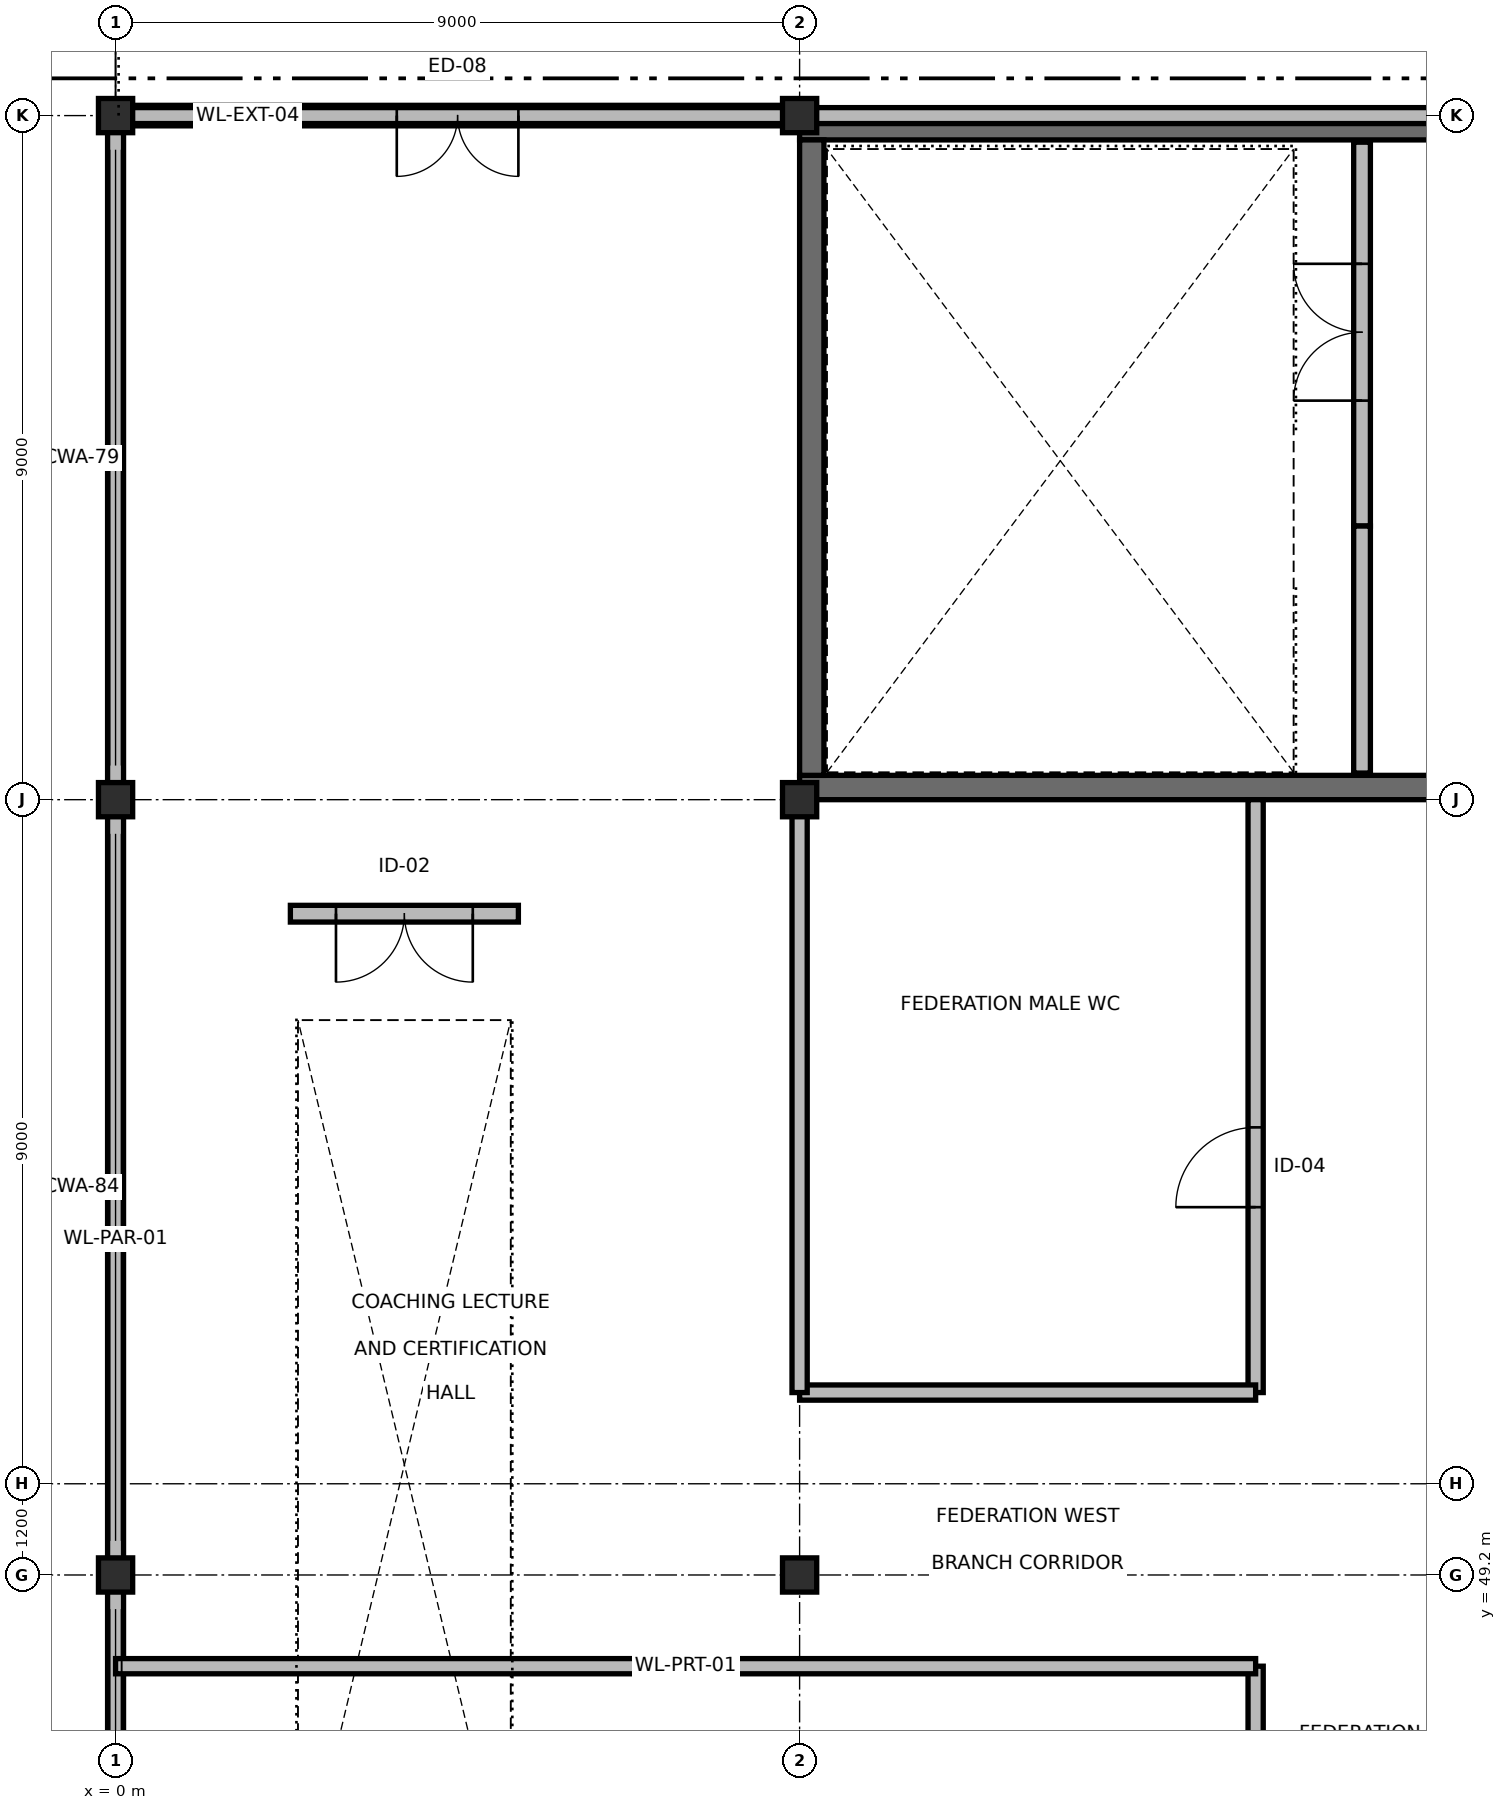
"""IFC4 building model, lengths in metres.
Left out: names, types, materials, properties, quantities, classifications, styles, units other than length and angle.
Written with IfcOpenShell. Run it as: python <this file> out.ifc"""

import sys

from ifc_helpers import new_model, si_unit, direction, frame, frame_2d, origin, origin_2d, place, context, subcontext, project, spatial, rectangle, extrude, element, fill, save


model = new_model("IFC4")
c1 = context("Model", 3, precision=1e-05, world=origin(), true_north=direction((0.0, 1.0)))
c2 = subcontext(c1, "Body", "Model", "MODEL_VIEW")
j1 = project(units=[si_unit("LENGTHUNIT", "METRE"), si_unit("PLANEANGLEUNIT", "RADIAN")], contexts=[c1])
p1 = place(None, origin())
s1 = spatial("IfcSite", under=j1, at=p1, CompositionType="ELEMENT")
p2 = place(p1, origin())
s2 = spatial("IfcBuilding", under=s1, at=p2, CompositionType="ELEMENT")
p3 = place(p2, frame((0.0, 0.0, 18.6)))
s3 = spatial("IfcBuildingStorey", under=s2, at=p3, CompositionType="ELEMENT", Elevation=18.6)
for number, where, z_axis, x_axis in (
    (1, (0.0, 49.2, 0.0), (0.0, 0.0, 1.0), (1.0, 0.0, 0.0)),
    (2, (0.0, 59.4, 0.0), (0.0, 0.0, 1.0), (1.0, 0.0, 0.0)),
    (3, (0.0, 68.4, 0.0), (0.0, 0.0, 1.0), (1.0, 0.0, 0.0)),
    (4, (9.0, 49.2, 0.0), (0.0, 0.0, 1.0), (1.0, 0.0, 0.0)),
    (5, (9.0, 59.4, 0.0), (0.0, 0.0, 1.0), (1.0, 0.0, 0.0)),
    (6, (9.0, 68.4, 0.0), (0.0, 0.0, 1.0), (1.0, 0.0, 0.0)),
):
    element("IfcColumn", number, at=place(p3, frame(where, z_axis=z_axis, x_axis=x_axis)), inside=s3, PredefinedType="COLUMN", context=c2, shape_type="SweptSolid", body=[
        extrude(rectangle(XDim=0.45, YDim=0.45, at=origin_2d()), origin(), (0.0, 0.0, 1.0), 4.2),
    ])
for number, where, z_axis, x_axis in (
    (7, (9.0, 59.56, 0.0), (0.0, 0.0, 1.0), (1.0, 0.0, 0.0)),
    (8, (9.0, 68.24, 0.0), (0.0, 0.0, 1.0), (1.0, 0.0, 0.0)),
):
    element("IfcWall", number, at=place(p3, frame(where, z_axis=z_axis, x_axis=x_axis)), inside=s3, PredefinedType="SHEAR", context=c2, shape_type="SweptSolid", body=[
        extrude(rectangle(XDim=9.2, YDim=0.32, at=frame_2d((4.6, 0.0))), origin(), (0.0, 0.0, 1.0), 4.2),
    ])
p4 = place(p3, frame((9.16, 59.72, 0.0), z_axis=(0.0, 0.0, 1.0), x_axis=(0.0, 1.0, 0.0)))
e9 = element("IfcWall", 9, at=p4, inside=s3, PredefinedType="SHEAR", context=c2, shape_type="SweptSolid", body=[
    extrude(rectangle(XDim=8.36, YDim=0.32, at=frame_2d((4.18, 0.0))), origin(), (0.0, 0.0, 1.0), 4.2),
])
p5 = place(p3, frame((0.23, 68.4, 0.0), z_axis=(0.0, 0.0, 1.0), x_axis=(1.0, 0.0, 0.0)))
e10 = element("IfcWall", 10, at=p5, inside=s3, PredefinedType="SOLIDWALL", context=c2, shape_type="SweptSolid", body=[
    extrude(rectangle(XDim=8.54, YDim=0.27, at=frame_2d((4.27, 0.0))), origin(), (0.0, 0.0, 1.0), 3.25),
])
p6 = place(p5, frame((3.47, 0.0, 0.0)))
e11 = element("IfcOpeningElement", 11, at=p6, cuts=e10, PredefinedType="OPENING", context=c2, shape_type="SweptSolid", body=[
    extrude(rectangle(XDim=1.6, YDim=2.2, at=frame_2d((0.8, 1.1))), frame((0.0, 0.145, 0.0), z_axis=(0.0, -1.0, 0.0), x_axis=(1.0, 0.0, 0.0)), (0.0, 0.0, 1.0), 0.29),
])
p7 = place(p3, frame((27.0, 68.4, 4.2), z_axis=(0.0, 0.0, 1.0), x_axis=(-1.0, 0.0, 0.0)))
e12 = element("IfcWall", 12, at=p7, inside=s3, PredefinedType="PARAPET", context=c2, shape_type="SweptSolid", body=[
    extrude(rectangle(XDim=27.0, YDim=0.21, at=frame_2d((13.5, 0.0))), origin(), (0.0, 0.0, 1.0), 1.15),
])
p8 = place(p3, frame((0.0, 68.29, 4.2), z_axis=(0.0, 0.0, 1.0), x_axis=(0.0, -1.0, 0.0)))
e13 = element("IfcWall", 13, at=p8, inside=s3, PredefinedType="PARAPET", context=c2, shape_type="SweptSolid", body=[
    extrude(rectangle(XDim=63.98, YDim=0.21, at=frame_2d((31.99, 0.0))), origin(), (0.0, 0.0, 1.0), 1.15),
])
p9 = place(p3, frame((16.4, 68.05, 0.0), z_axis=(0.0, 0.0, 1.0), x_axis=(0.0, -1.0, 0.0)))
e14 = element("IfcWall", 14, at=p9, inside=s3, PredefinedType="PARTITIONING", context=c2, shape_type="SweptSolid", body=[
    extrude(rectangle(XDim=5.05, YDim=0.22, at=frame_2d((2.525, 0.0))), origin(), (0.0, 0.0, 1.0), 3.255),
])
p10 = place(p9, frame((1.6, 0.0, 0.0)))
e15 = element("IfcOpeningElement", 15, at=p10, cuts=e14, PredefinedType="OPENING", context=c2, shape_type="SweptSolid", body=[
    extrude(rectangle(XDim=1.8, YDim=2.2, at=frame_2d((0.9, 1.1))), frame((0.0, 0.12, 0.0), z_axis=(0.0, -1.0, 0.0), x_axis=(1.0, 0.0, 0.0)), (0.0, 0.0, 1.0), 0.24),
])
p11 = place(p3, frame((16.4, 59.75, 0.0), z_axis=(0.0, 0.0, 1.0), x_axis=(0.0, 1.0, 0.0)))
e16 = element("IfcWall", 16, at=p11, inside=s3, PredefinedType="PARTITIONING", context=c2, shape_type="SweptSolid", body=[
    extrude(rectangle(XDim=3.25, YDim=0.22, at=frame_2d((1.625, 0.0))), origin(), (0.0, 0.0, 1.0), 3.305),
])
p12 = place(p3, frame((15.0, 36.6, 0.0), z_axis=(0.0, 0.0, 1.0), x_axis=(0.0, 1.0, 0.0)))
e17 = element("IfcWall", 17, at=p12, inside=s3, PredefinedType="PARTITIONING", context=c2, shape_type="SweptSolid", body=[
    extrude(rectangle(XDim=11.4, YDim=0.2, at=frame_2d((5.7, 0.0))), origin(), (0.0, 0.0, 1.0), 3.305),
])
p13 = place(p12, frame((7.683, 0.0, 0.0)))
e18 = element("IfcOpeningElement", 18, at=p13, cuts=e17, PredefinedType="OPENING", context=c2, shape_type="SweptSolid", body=[
    extrude(rectangle(XDim=1.05, YDim=2.15, at=frame_2d((0.525, 1.075))), frame((0.0, 0.11, 0.0), z_axis=(0.0, -1.0, 0.0), x_axis=(1.0, 0.0, 0.0)), (0.0, 0.0, 1.0), 0.22),
])
p14 = place(p3, frame((0.0, 48.0, 0.0), z_axis=(0.0, 0.0, 1.0), x_axis=(1.0, 0.0, 0.0)))
e19 = element("IfcWall", 19, at=p14, inside=s3, PredefinedType="PARTITIONING", context=c2, shape_type="SweptSolid", body=[
    extrude(rectangle(XDim=15.0, YDim=0.2, at=frame_2d((7.5, 0.0))), origin(), (0.0, 0.0, 1.0), 3.255),
])
p15 = place(p3, frame((15.0, 51.6, 0.0), z_axis=(0.0, 0.0, 1.0), x_axis=(0.0, 1.0, 0.0)))
e20 = element("IfcWall", 20, at=p15, inside=s3, PredefinedType="PARTITIONING", context=c2, shape_type="SweptSolid", body=[
    extrude(rectangle(XDim=7.8, YDim=0.2, at=frame_2d((3.9, 0.0))), origin(), (0.0, 0.0, 1.0), 3.305),
])
p16 = place(p15, frame((2.439, 0.0, 0.0)))
e21 = element("IfcOpeningElement", 21, at=p16, cuts=e20, PredefinedType="OPENING", context=c2, shape_type="SweptSolid", body=[
    extrude(rectangle(XDim=1.05, YDim=2.15, at=frame_2d((0.525, 1.075))), frame((0.0, 0.11, 0.0), z_axis=(0.0, -1.0, 0.0), x_axis=(1.0, 0.0, 0.0)), (0.0, 0.0, 1.0), 0.22),
])
p17 = place(p3, frame((9.0, 51.6, 0.0), z_axis=(0.0, 0.0, 1.0), x_axis=(1.0, 0.0, 0.0)))
e22 = element("IfcWall", 22, at=p17, inside=s3, PredefinedType="PARTITIONING", context=c2, shape_type="SweptSolid", body=[
    extrude(rectangle(XDim=6.0, YDim=0.2, at=frame_2d((3.0, 0.0))), origin(), (0.0, 0.0, 1.0), 3.205),
])
p18 = place(p3, frame((9.0, 51.6, 0.0), z_axis=(0.0, 0.0, 1.0), x_axis=(0.0, 1.0, 0.0)))
e23 = element("IfcWall", 23, at=p18, inside=s3, PredefinedType="PARTITIONING", context=c2, shape_type="SweptSolid", body=[
    extrude(rectangle(XDim=7.8, YDim=0.2, at=frame_2d((3.9, 0.0))), origin(), (0.0, 0.0, 1.0), 3.205),
])
p19 = place(p3, frame((2.3, 57.9, 0.0), z_axis=(0.0, 0.0, 1.0), x_axis=(1.0, 0.0, 0.0)))
e24 = element("IfcWall", 24, at=p19, inside=s3, PredefinedType="PARTITIONING", context=c2, shape_type="SweptSolid", body=[
    extrude(rectangle(XDim=3.0, YDim=0.22, at=frame_2d((1.5, 0.0))), origin(), (0.0, 0.0, 1.0), 3.685),
])
p20 = place(p19, frame((0.6, 0.0, 0.0)))
e25 = element("IfcOpeningElement", 25, at=p20, cuts=e24, PredefinedType="OPENING", context=c2, shape_type="SweptSolid", body=[
    extrude(rectangle(XDim=1.8, YDim=2.2, at=frame_2d((0.9, 1.1))), frame((0.0, 0.12, 0.0), z_axis=(0.0, -1.0, 0.0), x_axis=(1.0, 0.0, 0.0)), (0.0, 0.0, 1.0), 0.24),
])
p21 = place(p6, origin())
e26 = element("IfcDoor", 26, at=p21, inside=s3, OperationType="DOUBLE_DOOR_SINGLE_SWING", PredefinedType="DOOR", context=c2, shape_type="SweptSolid", body=[
    extrude(rectangle(XDim=1.6, YDim=2.2, at=frame_2d((0.8, 1.1))), frame((0.0, 0.025, 0.0), z_axis=(0.0, -1.0, 0.0), x_axis=(1.0, 0.0, 0.0)), (0.0, 0.0, 1.0), 0.05),
])
fill(e11, e26)
p22 = place(p10, origin())
e27 = element("IfcDoor", 27, at=p22, inside=s3, OperationType="DOUBLE_DOOR_SINGLE_SWING", PredefinedType="DOOR", context=c2, shape_type="SweptSolid", body=[
    extrude(rectangle(XDim=1.8, YDim=2.2, at=frame_2d((0.9, 1.1))), frame((0.0, 0.025, 0.0), z_axis=(0.0, -1.0, 0.0), x_axis=(1.0, 0.0, 0.0)), (0.0, 0.0, 1.0), 0.05),
])
fill(e15, e27)
p23 = place(p16, origin())
e28 = element("IfcDoor", 28, at=p23, inside=s3, OperationType="SINGLE_SWING_LEFT", PredefinedType="DOOR", context=c2, shape_type="SweptSolid", body=[
    extrude(rectangle(XDim=1.05, YDim=2.15, at=frame_2d((0.525, 1.075))), frame((0.0, 0.025, 0.0), z_axis=(0.0, -1.0, 0.0), x_axis=(1.0, 0.0, 0.0)), (0.0, 0.0, 1.0), 0.05),
])
fill(e21, e28)
p24 = place(p20, origin())
e29 = element("IfcDoor", 29, at=p24, inside=s3, OperationType="DOUBLE_DOOR_SINGLE_SWING", PredefinedType="DOOR", context=c2, shape_type="SweptSolid", body=[
    extrude(rectangle(XDim=1.8, YDim=2.2, at=frame_2d((0.9, 1.1))), frame((0.0, 0.025, 0.0), z_axis=(0.0, -1.0, 0.0), x_axis=(1.0, 0.0, 0.0)), (0.0, 0.0, 1.0), 0.05),
])
fill(e25, e29)
save(model, sys.argv[1])
